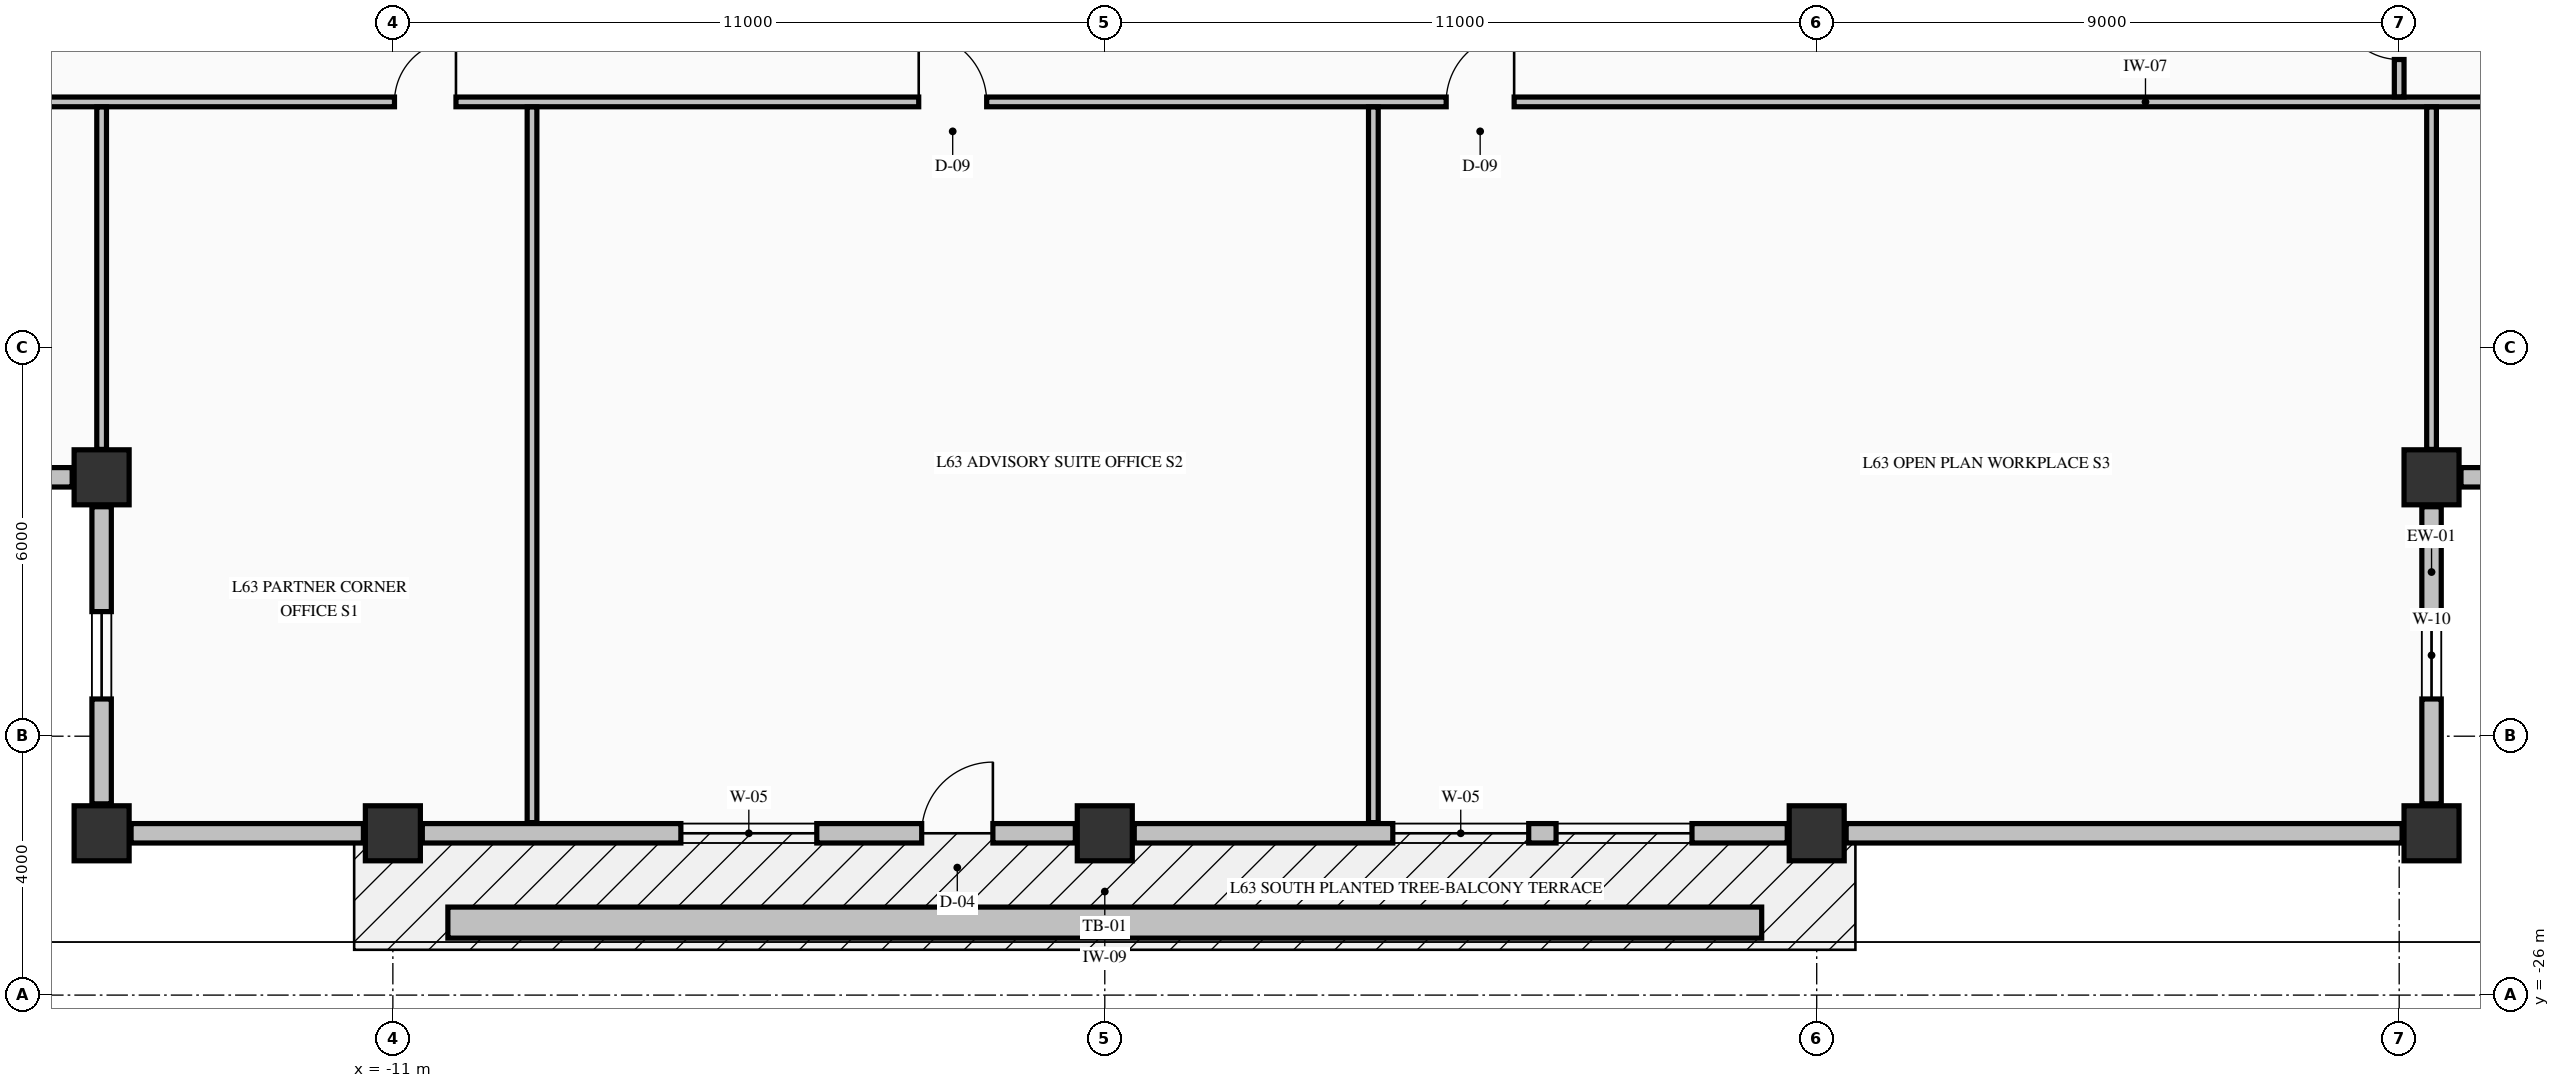
"""IFC4 building model, lengths in metres.
Left out: names, types, materials, properties, quantities, classifications, styles, units other than length and angle.
Written with IfcOpenShell. Run it as: python <this file> out.ifc"""

import sys

from ifc_helpers import new_model, si_unit, direction, frame, frame_2d, origin, origin_2d, place, context, subcontext, project, spatial, rectangle, extrude, element, fill, save


model = new_model("IFC4")
c1 = context("Model", 3, precision=1e-05, world=origin(), true_north=direction((0.0, 1.0)))
c2 = subcontext(c1, "Body", "Model", "MODEL_VIEW")
j1 = project(units=[si_unit("LENGTHUNIT", "METRE"), si_unit("PLANEANGLEUNIT", "RADIAN")], contexts=[c1])
p1 = place(None, origin())
s1 = spatial("IfcSite", under=j1, at=p1, CompositionType="ELEMENT")
p2 = place(p1, origin())
s2 = spatial("IfcBuilding", under=s1, at=p2, CompositionType="ELEMENT")
p3 = place(p2, frame((0.0, 0.0, 239.74)))
s3 = spatial("IfcBuildingStorey", under=s2, at=p3, CompositionType="ELEMENT", Elevation=239.74)
for number, where, z_axis, x_axis in (
    (1, (-15.5, -23.5, -0.25), (0.0, 0.0, 1.0), (1.0, 0.0, 0.0)),
    (2, (-11.0, -23.5, -0.25), (0.0, 0.0, 1.0), (1.0, 0.0, 0.0)),
    (3, (0.0, -23.5, -0.25), (0.0, 0.0, 1.0), (1.0, 0.0, 0.0)),
    (4, (11.0, -23.5, -0.25), (0.0, 0.0, 1.0), (1.0, 0.0, 0.0)),
    (5, (20.5, -23.5, -0.25), (0.0, 0.0, 1.0), (1.0, 0.0, 0.0)),
    (6, (-15.5, -18.0, -0.25), (0.0, 0.0, 1.0), (1.0, 0.0, 0.0)),
    (7, (20.5, -18.0, -0.25), (0.0, 0.0, 1.0), (1.0, 0.0, 0.0)),
):
    element("IfcColumn", number, at=place(p3, frame(where, z_axis=z_axis, x_axis=x_axis)), inside=s3, PredefinedType="COLUMN", context=c2, shape_type="SweptSolid", body=[
        extrude(rectangle(XDim=0.85, YDim=0.85, at=origin_2d()), origin(), (0.0, 0.0, 1.0), 3.23),
    ])
p4 = place(p3, frame((20.5, -23.045, 0.0), z_axis=(0.0, 0.0, 1.0), x_axis=(0.0, 1.0, 0.0)))
e8 = element("IfcWall", 8, at=p4, inside=s3, PredefinedType="STANDARD", context=c2, shape_type="SweptSolid", body=[
    extrude(rectangle(XDim=4.59, YDim=0.3, at=frame_2d((2.295, 0.0))), origin(), (0.0, 0.0, 1.0), 2.372),
])
p5 = place(p4, frame((1.62, 0.0, 0.68)))
e9 = element("IfcOpeningElement", 9, at=p5, cuts=e8, PredefinedType="OPENING", context=c2, shape_type="SweptSolid", body=[
    extrude(rectangle(XDim=1.35, YDim=1.42, at=frame_2d((0.675, 0.71))), frame((0.0, 0.16, 0.0), z_axis=(0.0, -1.0, 0.0), x_axis=(1.0, 0.0, 0.0)), (0.0, 0.0, 1.0), 0.32),
])
p6 = place(p3, frame((20.955, -18.0, 0.0), z_axis=(0.0, 0.0, 1.0), x_axis=(1.0, 0.0, 0.0)))
e10 = element("IfcWall", 10, at=p6, inside=s3, PredefinedType="STANDARD", context=c2, shape_type="SweptSolid", body=[
    extrude(rectangle(XDim=4.59, YDim=0.3, at=frame_2d((2.295, 0.0))), origin(), (0.0, 0.0, 1.0), 2.372),
])
p7 = place(p6, frame((1.62, 0.0, 0.68)))
e11 = element("IfcOpeningElement", 11, at=p7, cuts=e10, PredefinedType="OPENING", context=c2, shape_type="SweptSolid", body=[
    extrude(rectangle(XDim=1.35, YDim=1.42, at=frame_2d((0.675, 0.71))), frame((0.0, 0.16, 0.0), z_axis=(0.0, -1.0, 0.0), x_axis=(1.0, 0.0, 0.0)), (0.0, 0.0, 1.0), 0.32),
])
p8 = place(p3, frame((-20.545, -18.0, 0.0), z_axis=(0.0, 0.0, 1.0), x_axis=(1.0, 0.0, 0.0)))
e12 = element("IfcWall", 12, at=p8, inside=s3, PredefinedType="STANDARD", context=c2, shape_type="SweptSolid", body=[
    extrude(rectangle(XDim=4.59, YDim=0.3, at=frame_2d((2.295, 0.0))), origin(), (0.0, 0.0, 1.0), 2.372),
])
p9 = place(p8, frame((1.62, 0.0, 0.68)))
e13 = element("IfcOpeningElement", 13, at=p9, cuts=e12, PredefinedType="OPENING", context=c2, shape_type="SweptSolid", body=[
    extrude(rectangle(XDim=1.35, YDim=1.42, at=frame_2d((0.675, 0.71))), frame((0.0, 0.16, 0.0), z_axis=(0.0, -1.0, 0.0), x_axis=(1.0, 0.0, 0.0)), (0.0, 0.0, 1.0), 0.32),
])
p10 = place(p3, frame((-15.5, -18.455, 0.0), z_axis=(0.0, 0.0, 1.0), x_axis=(0.0, -1.0, 0.0)))
e14 = element("IfcWall", 14, at=p10, inside=s3, PredefinedType="STANDARD", context=c2, shape_type="SweptSolid", body=[
    extrude(rectangle(XDim=4.59, YDim=0.3, at=frame_2d((2.295, 0.0))), origin(), (0.0, 0.0, 1.0), 2.372),
])
p11 = place(p10, frame((1.62, 0.0, 0.68)))
e15 = element("IfcOpeningElement", 15, at=p11, cuts=e14, PredefinedType="OPENING", context=c2, shape_type="SweptSolid", body=[
    extrude(rectangle(XDim=1.35, YDim=1.42, at=frame_2d((0.675, 0.71))), frame((0.0, 0.16, 0.0), z_axis=(0.0, -1.0, 0.0), x_axis=(1.0, 0.0, 0.0)), (0.0, 0.0, 1.0), 0.32),
])
p12 = place(p3, frame((-15.045, -23.5, 0.0), z_axis=(0.0, 0.0, 1.0), x_axis=(1.0, 0.0, 0.0)))
e16 = element("IfcWall", 16, at=p12, inside=s3, PredefinedType="STANDARD", context=c2, shape_type="SweptSolid", body=[
    extrude(rectangle(XDim=3.59, YDim=0.3, at=frame_2d((1.795, 0.0))), origin(), (0.0, 0.0, 1.0), 2.372),
])
p13 = place(p3, frame((-10.545, -23.5, 0.0), z_axis=(0.0, 0.0, 1.0), x_axis=(1.0, 0.0, 0.0)))
e17 = element("IfcWall", 17, at=p13, inside=s3, PredefinedType="STANDARD", context=c2, shape_type="SweptSolid", body=[
    extrude(rectangle(XDim=10.09, YDim=0.3, at=frame_2d((5.045, 0.0))), origin(), (0.0, 0.0, 1.0), 2.372),
])
p14 = place(p13, frame((7.716, 0.0, 0.0)))
e18 = element("IfcOpeningElement", 18, at=p14, cuts=e17, PredefinedType="OPENING", context=c2, shape_type="SweptSolid", body=[
    extrude(rectangle(XDim=1.1, YDim=2.15, at=frame_2d((0.55, 1.075))), frame((0.0, 0.16, 0.0), z_axis=(0.0, -1.0, 0.0), x_axis=(1.0, 0.0, 0.0)), (0.0, 0.0, 1.0), 0.32),
])
p15 = place(p13, frame((3.995, 0.0, 0.7)))
e19 = element("IfcOpeningElement", 19, at=p15, cuts=e17, PredefinedType="OPENING", context=c2, shape_type="SweptSolid", body=[
    extrude(rectangle(XDim=2.1, YDim=1.5, at=frame_2d((1.05, 0.75))), frame((0.0, 0.16, 0.0), z_axis=(0.0, -1.0, 0.0), x_axis=(1.0, 0.0, 0.0)), (0.0, 0.0, 1.0), 0.32),
])
p16 = place(p3, frame((0.455, -23.5, 0.0), z_axis=(0.0, 0.0, 1.0), x_axis=(1.0, 0.0, 0.0)))
e20 = element("IfcWall", 20, at=p16, inside=s3, PredefinedType="STANDARD", context=c2, shape_type="SweptSolid", body=[
    extrude(rectangle(XDim=10.09, YDim=0.3, at=frame_2d((5.045, 0.0))), origin(), (0.0, 0.0, 1.0), 2.372),
])
p17 = place(p16, frame((3.995, 0.0, 0.7)))
e21 = element("IfcOpeningElement", 21, at=p17, cuts=e20, PredefinedType="OPENING", context=c2, shape_type="SweptSolid", body=[
    extrude(rectangle(XDim=2.1, YDim=1.5, at=frame_2d((1.05, 0.75))), frame((0.0, 0.16, 0.0), z_axis=(0.0, -1.0, 0.0), x_axis=(1.0, 0.0, 0.0)), (0.0, 0.0, 1.0), 0.32),
])
p18 = place(p16, frame((6.518, 0.0, 0.7)))
e22 = element("IfcOpeningElement", 22, at=p18, cuts=e20, PredefinedType="OPENING", context=c2, shape_type="SweptSolid", body=[
    extrude(rectangle(XDim=2.1, YDim=1.5, at=frame_2d((1.05, 0.75))), frame((0.0, 0.16, 0.0), z_axis=(0.0, -1.0, 0.0), x_axis=(1.0, 0.0, 0.0)), (0.0, 0.0, 1.0), 0.32),
])
p19 = place(p3, frame((11.455, -23.5, 0.0), z_axis=(0.0, 0.0, 1.0), x_axis=(1.0, 0.0, 0.0)))
e23 = element("IfcWall", 23, at=p19, inside=s3, PredefinedType="STANDARD", context=c2, shape_type="SweptSolid", body=[
    extrude(rectangle(XDim=8.59, YDim=0.3, at=frame_2d((4.295, 0.0))), origin(), (0.0, 0.0, 1.0), 2.372),
])
p20 = place(p3, frame((-20.075, -12.2, 0.0), z_axis=(0.0, 0.0, 1.0), x_axis=(1.0, 0.0, 0.0)))
e24 = element("IfcWall", 24, at=p20, inside=s3, PredefinedType="PARTITIONING", context=c2, shape_type="SweptSolid", body=[
    extrude(rectangle(XDim=45.91, YDim=0.15, at=frame_2d((22.955, 0.0))), origin(), (0.0, 0.0, 1.0), 2.98),
])
p21 = place(p20, frame((9.1, 0.0, 0.0)))
e25 = element("IfcOpeningElement", 25, at=p21, cuts=e24, PredefinedType="OPENING", context=c2, shape_type="SweptSolid", body=[
    extrude(rectangle(XDim=0.95, YDim=2.15, at=frame_2d((0.475, 1.075))), frame((0.0, 0.085, 0.0), z_axis=(0.0, -1.0, 0.0), x_axis=(1.0, 0.0, 0.0)), (0.0, 0.0, 1.0), 0.17),
])
p22 = place(p20, frame((17.2, 0.0, 0.0)))
e26 = element("IfcOpeningElement", 26, at=p22, cuts=e24, PredefinedType="OPENING", context=c2, shape_type="SweptSolid", body=[
    extrude(rectangle(XDim=1.05, YDim=2.15, at=frame_2d((0.525, 1.075))), frame((0.0, 0.085, 0.0), z_axis=(0.0, -1.0, 0.0), x_axis=(1.0, 0.0, 0.0)), (0.0, 0.0, 1.0), 0.17),
])
p23 = place(p20, frame((25.35, 0.0, 0.0)))
e27 = element("IfcOpeningElement", 27, at=p23, cuts=e24, PredefinedType="OPENING", context=c2, shape_type="SweptSolid", body=[
    extrude(rectangle(XDim=1.05, YDim=2.15, at=frame_2d((0.525, 1.075))), frame((0.0, 0.085, 0.0), z_axis=(0.0, -1.0, 0.0), x_axis=(1.0, 0.0, 0.0)), (0.0, 0.0, 1.0), 0.17),
])
p24 = place(p3, frame((-15.5, -17.569, 0.0), z_axis=(0.0, 0.0, 1.0), x_axis=(0.0, 1.0, 0.0)))
e28 = element("IfcWall", 28, at=p24, inside=s3, PredefinedType="PARTITIONING", context=c2, shape_type="SweptSolid", body=[
    extrude(rectangle(XDim=5.291, YDim=0.15, at=frame_2d((2.646, 0.0))), origin(), (0.0, 0.0, 1.0), 2.98),
])
for number, where, z_axis, x_axis in (
    (29, (-8.85, -23.335, 0.0), (0.0, 0.0, 1.0), (0.0, 1.0, 0.0)),
    (30, (4.15, -23.335, 0.0), (0.0, 0.0, 1.0), (0.0, 1.0, 0.0)),
):
    element("IfcWall", number, at=place(p3, frame(where, z_axis=z_axis, x_axis=x_axis)), inside=s3, PredefinedType="PARTITIONING", context=c2, shape_type="SweptSolid", body=[
        extrude(rectangle(XDim=11.057, YDim=0.15, at=frame_2d((5.528, 0.0))), origin(), (0.0, 0.0, 1.0), 2.98),
    ])
p25 = place(p3, frame((20.0, -12.122, 0.0), z_axis=(0.0, 0.0, 1.0), x_axis=(0.0, 1.0, 0.0)))
e31 = element("IfcWall", 31, at=p25, inside=s3, PredefinedType="PARTITIONING", context=c2, shape_type="SweptSolid", body=[
    extrude(rectangle(XDim=1.816, YDim=0.15, at=frame_2d((0.908, 0.0))), origin(), (0.0, 0.0, 1.0), 2.98),
])
p26 = place(p25, frame((0.577, 0.0, 0.0)))
e32 = element("IfcOpeningElement", 32, at=p26, cuts=e31, PredefinedType="OPENING", context=c2, shape_type="SweptSolid", body=[
    extrude(rectangle(XDim=0.95, YDim=2.15, at=frame_2d((0.475, 1.075))), frame((0.0, 0.085, 0.0), z_axis=(0.0, -1.0, 0.0), x_axis=(1.0, 0.0, 0.0)), (0.0, 0.0, 1.0), 0.17),
])
p27 = place(p3, frame((20.5, -17.569, 0.0), z_axis=(0.0, 0.0, 1.0), x_axis=(0.0, 1.0, 0.0)))
e33 = element("IfcWall", 33, at=p27, inside=s3, PredefinedType="PARTITIONING", context=c2, shape_type="SweptSolid", body=[
    extrude(rectangle(XDim=5.291, YDim=0.15, at=frame_2d((2.646, 0.0))), origin(), (0.0, 0.0, 1.0), 2.98),
])
p28 = place(p3, frame((-10.15, -24.88, -0.04), z_axis=(0.0, 0.0, 1.0), x_axis=(1.0, 0.0, 0.0)))
e34 = element("IfcWall", 34, at=p28, inside=s3, PredefinedType="PARAPET", context=c2, shape_type="SweptSolid", body=[
    extrude(rectangle(XDim=20.3, YDim=0.48, at=frame_2d((10.15, 0.0))), origin(), (0.0, 0.0, 1.0), 0.52),
])
p29 = place(p5, origin())
e35 = element("IfcWindow", 35, at=p29, inside=s3, PartitioningType="SINGLE_PANEL", PredefinedType="WINDOW", context=c2, shape_type="SweptSolid", body=[
    extrude(rectangle(XDim=1.35, YDim=1.42, at=frame_2d((0.675, 0.71))), frame((0.0, 0.03, 0.0), z_axis=(0.0, -1.0, 0.0), x_axis=(1.0, 0.0, 0.0)), (0.0, 0.0, 1.0), 0.06),
])
fill(e9, e35)
p30 = place(p11, origin())
e36 = element("IfcWindow", 36, at=p30, inside=s3, PartitioningType="SINGLE_PANEL", PredefinedType="WINDOW", context=c2, shape_type="SweptSolid", body=[
    extrude(rectangle(XDim=1.35, YDim=1.42, at=frame_2d((0.675, 0.71))), frame((0.0, 0.03, 0.0), z_axis=(0.0, -1.0, 0.0), x_axis=(1.0, 0.0, 0.0)), (0.0, 0.0, 1.0), 0.06),
])
fill(e15, e36)
p31 = place(p14, origin())
e37 = element("IfcDoor", 37, at=p31, inside=s3, OperationType="SINGLE_SWING_RIGHT", PredefinedType="DOOR", context=c2, shape_type="SweptSolid", body=[
    extrude(rectangle(XDim=1.1, YDim=2.15, at=frame_2d((0.55, 1.075))), frame((0.0, 0.025, 0.0), z_axis=(0.0, -1.0, 0.0), x_axis=(1.0, 0.0, 0.0)), (0.0, 0.0, 1.0), 0.05),
])
fill(e18, e37)
p32 = place(p15, origin())
e38 = element("IfcWindow", 38, at=p32, inside=s3, PartitioningType="SINGLE_PANEL", PredefinedType="WINDOW", context=c2, shape_type="SweptSolid", body=[
    extrude(rectangle(XDim=2.1, YDim=1.5, at=frame_2d((1.05, 0.75))), frame((0.0, 0.03, 0.0), z_axis=(0.0, -1.0, 0.0), x_axis=(1.0, 0.0, 0.0)), (0.0, 0.0, 1.0), 0.06),
])
fill(e19, e38)
p33 = place(p17, origin())
e39 = element("IfcWindow", 39, at=p33, inside=s3, PartitioningType="SINGLE_PANEL", PredefinedType="WINDOW", context=c2, shape_type="SweptSolid", body=[
    extrude(rectangle(XDim=2.1, YDim=1.5, at=frame_2d((1.05, 0.75))), frame((0.0, 0.03, 0.0), z_axis=(0.0, -1.0, 0.0), x_axis=(1.0, 0.0, 0.0)), (0.0, 0.0, 1.0), 0.06),
])
fill(e21, e39)
p34 = place(p18, origin())
e40 = element("IfcWindow", 40, at=p34, inside=s3, PartitioningType="SINGLE_PANEL", PredefinedType="WINDOW", context=c2, shape_type="SweptSolid", body=[
    extrude(rectangle(XDim=2.1, YDim=1.5, at=frame_2d((1.05, 0.75))), frame((0.0, 0.03, 0.0), z_axis=(0.0, -1.0, 0.0), x_axis=(1.0, 0.0, 0.0)), (0.0, 0.0, 1.0), 0.06),
])
fill(e22, e40)
p35 = place(p21, origin())
e41 = element("IfcDoor", 41, at=p35, inside=s3, OperationType="SINGLE_SWING_RIGHT", PredefinedType="DOOR", context=c2, shape_type="SweptSolid", body=[
    extrude(rectangle(XDim=0.95, YDim=2.15, at=frame_2d((0.475, 1.075))), frame((0.0, 0.025, 0.0), z_axis=(0.0, -1.0, 0.0), x_axis=(1.0, 0.0, 0.0)), (0.0, 0.0, 1.0), 0.05),
])
fill(e25, e41)
p36 = place(p22, origin())
e42 = element("IfcDoor", 42, at=p36, inside=s3, OperationType="SINGLE_SWING_LEFT", PredefinedType="DOOR", context=c2, shape_type="SweptSolid", body=[
    extrude(rectangle(XDim=1.05, YDim=2.15, at=frame_2d((0.525, 1.075))), frame((0.0, 0.025, 0.0), z_axis=(0.0, -1.0, 0.0), x_axis=(1.0, 0.0, 0.0)), (0.0, 0.0, 1.0), 0.05),
])
fill(e26, e42)
p37 = place(p23, origin())
e43 = element("IfcDoor", 43, at=p37, inside=s3, OperationType="SINGLE_SWING_RIGHT", PredefinedType="DOOR", context=c2, shape_type="SweptSolid", body=[
    extrude(rectangle(XDim=1.05, YDim=2.15, at=frame_2d((0.525, 1.075))), frame((0.0, 0.025, 0.0), z_axis=(0.0, -1.0, 0.0), x_axis=(1.0, 0.0, 0.0)), (0.0, 0.0, 1.0), 0.05),
])
fill(e27, e43)
p38 = place(p26, origin())
e44 = element("IfcDoor", 44, at=p38, inside=s3, OperationType="SINGLE_SWING_RIGHT", PredefinedType="DOOR", context=c2, shape_type="SweptSolid", body=[
    extrude(rectangle(XDim=0.95, YDim=2.15, at=frame_2d((0.475, 1.075))), frame((0.0, 0.025, 0.0), z_axis=(0.0, -1.0, 0.0), x_axis=(1.0, 0.0, 0.0)), (0.0, 0.0, 1.0), 0.05),
])
fill(e32, e44)
save(model, sys.argv[1])
